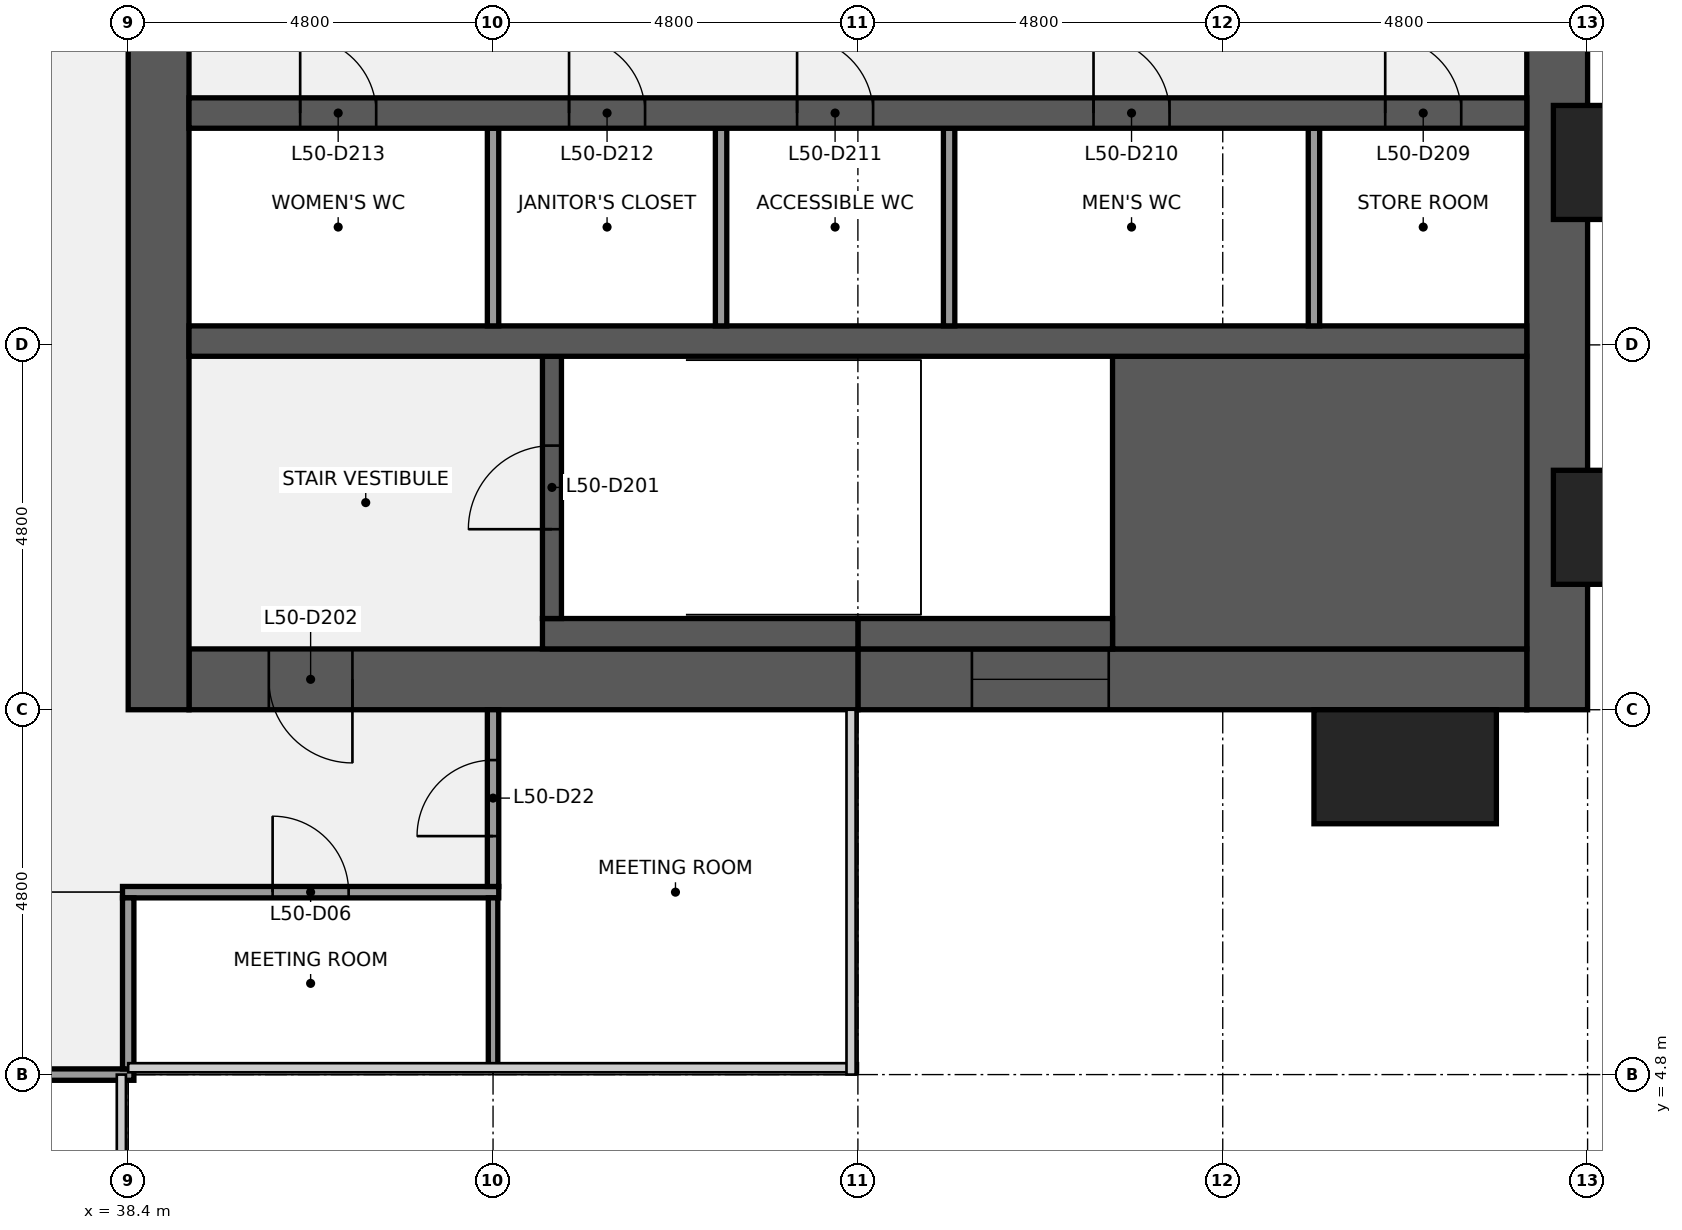
"""IFC4 building model, lengths in metres.
Left out: names, types, materials, properties, quantities, classifications, styles, units other than length and angle.
Written with IfcOpenShell. Run it as: python <this file> out.ifc"""

import sys

from ifc_helpers import new_model, si_unit, direction, frame, frame_2d, origin, origin_2d, place, context, subcontext, project, spatial, rectangle, extrude, element, fill, save


model = new_model("IFC4")
c1 = context("Model", 3, precision=1e-05, world=origin(), true_north=direction((0.0, 1.0)))
c2 = subcontext(c1, "Body", "Model", "MODEL_VIEW")
j1 = project(units=[si_unit("LENGTHUNIT", "METRE"), si_unit("PLANEANGLEUNIT", "RADIAN")], contexts=[c1])
p1 = place(None, origin())
s1 = spatial("IfcSite", under=j1, at=p1, CompositionType="ELEMENT")
p2 = place(p1, origin())
s2 = spatial("IfcBuilding", under=s1, at=p2, CompositionType="ELEMENT")
p3 = place(p2, frame((0.0, 0.0, 229.2)))
s3 = spatial("IfcBuildingStorey", under=s2, at=p3, CompositionType="ELEMENT", Elevation=229.2)
p4 = place(p3, frame((57.2, 38.4, 0.0), z_axis=(0.0, 0.0, 1.0), x_axis=(0.0, -1.0, 0.0)))
e1 = element("IfcWall", 1, at=p4, inside=s3, PredefinedType="SHEAR", context=c2, shape_type="SweptSolid", body=[
    extrude(rectangle(XDim=28.8, YDim=0.8, at=frame_2d((14.4, 0.0))), origin(), (0.0, 0.0, 1.0), 3.84),
])
p5 = place(p4, frame((18.45, 0.0, 0.9)))
e2 = element("IfcOpeningElement", 2, at=p5, cuts=e1, PredefinedType="OPENING", context=c2, shape_type="SweptSolid", body=[
    extrude(rectangle(XDim=1.5, YDim=1.5, at=frame_2d((0.75, 0.75))), frame((0.0, 0.41, 0.0), z_axis=(0.0, -1.0, 0.0), x_axis=(1.0, 0.0, 0.0)), (0.0, 0.0, 1.0), 0.82),
])
p6 = place(p4, frame((8.85, 0.0, 0.9)))
e3 = element("IfcOpeningElement", 3, at=p6, cuts=e1, PredefinedType="OPENING", context=c2, shape_type="SweptSolid", body=[
    extrude(rectangle(XDim=1.5, YDim=1.5, at=frame_2d((0.75, 0.75))), frame((0.0, 0.41, 0.0), z_axis=(0.0, -1.0, 0.0), x_axis=(1.0, 0.0, 0.0)), (0.0, 0.0, 1.0), 0.82),
])
p7 = place(p3, frame((56.8, 10.0, 0.0), z_axis=(0.0, 0.0, 1.0), x_axis=(-1.0, 0.0, 0.0)))
e4 = element("IfcWall", 4, at=p7, inside=s3, PredefinedType="SHEAR", context=c2, shape_type="SweptSolid", body=[
    extrude(rectangle(XDim=8.8, YDim=0.8, at=frame_2d((4.4, 0.0))), origin(), (0.0, 0.0, 1.0), 3.84),
])
p8 = place(p7, frame((5.5, 0.0, 0.9)))
e5 = element("IfcOpeningElement", 5, at=p8, cuts=e4, PredefinedType="OPENING", context=c2, shape_type="SweptSolid", body=[
    extrude(rectangle(XDim=1.8, YDim=1.5, at=frame_2d((0.9, 0.75))), frame((0.0, 0.41, 0.0), z_axis=(0.0, -1.0, 0.0), x_axis=(1.0, 0.0, 0.0)), (0.0, 0.0, 1.0), 0.82),
])
p9 = place(p3, frame((48.0, 10.0, 0.0), z_axis=(0.0, 0.0, 1.0), x_axis=(-1.0, 0.0, 0.0)))
e6 = element("IfcWall", 6, at=p9, inside=s3, PredefinedType="SHEAR", context=c2, shape_type="SweptSolid", body=[
    extrude(rectangle(XDim=8.8, YDim=0.8, at=frame_2d((4.4, 0.0))), origin(), (0.0, 0.0, 1.0), 3.84),
])
p10 = place(p9, frame((6.65, 0.0, 0.0)))
e7 = element("IfcOpeningElement", 7, at=p10, cuts=e6, PredefinedType="OPENING", context=c2, shape_type="SweptSolid", body=[
    extrude(rectangle(XDim=1.1, YDim=2.1, at=frame_2d((0.55, 1.05))), frame((0.0, 0.41, 0.0), z_axis=(0.0, -1.0, 0.0), x_axis=(1.0, 0.0, 0.0)), (0.0, 0.0, 1.0), 0.82),
])
p11 = place(p3, frame((38.8, 9.6, 0.0), z_axis=(0.0, 0.0, 1.0), x_axis=(0.0, 1.0, 0.0)))
e8 = element("IfcWall", 8, at=p11, inside=s3, PredefinedType="SHEAR", context=c2, shape_type="SweptSolid", body=[
    extrude(rectangle(XDim=28.8, YDim=0.8, at=frame_2d((14.4, 0.0))), origin(), (0.0, 0.0, 1.0), 3.84),
])
p12 = place(p11, frame((8.7, 0.0, 0.0)))
e9 = element("IfcOpeningElement", 9, at=p12, cuts=e8, PredefinedType="OPENING", context=c2, shape_type="SweptSolid", body=[
    extrude(rectangle(XDim=1.8, YDim=2.1, at=frame_2d((0.9, 1.05))), frame((0.0, 0.41, 0.0), z_axis=(0.0, -1.0, 0.0), x_axis=(1.0, 0.0, 0.0)), (0.0, 0.0, 1.0), 0.82),
])
p13 = place(p11, frame((18.3, 0.0, 0.0)))
e10 = element("IfcOpeningElement", 10, at=p13, cuts=e8, PredefinedType="OPENING", context=c2, shape_type="SweptSolid", body=[
    extrude(rectangle(XDim=1.8, YDim=2.1, at=frame_2d((0.9, 1.05))), frame((0.0, 0.41, 0.0), z_axis=(0.0, -1.0, 0.0), x_axis=(1.0, 0.0, 0.0)), (0.0, 0.0, 1.0), 0.82),
])
p14 = place(p3, frame((51.35, 12.325, 0.0), z_axis=(0.0, 0.0, 1.0), x_axis=(1.0, 0.0, 0.0)))
e11 = element("IfcWall", 11, at=p14, inside=s3, PredefinedType="SHEAR", context=c2, shape_type="SweptSolid", body=[
    extrude(rectangle(XDim=5.45, YDim=3.85, at=frame_2d((2.725, 0.0))), origin(), (0.0, 0.0, 1.0), 3.84),
])
p15 = place(p3, frame((48.0, 10.6, 0.0), z_axis=(0.0, 0.0, 1.0), x_axis=(1.0, 0.0, 0.0)))
e12 = element("IfcWall", 12, at=p15, inside=s3, PredefinedType="SHEAR", context=c2, shape_type="SweptSolid", body=[
    extrude(rectangle(XDim=3.35, YDim=0.4, at=frame_2d((1.675, 0.0))), origin(), (0.0, 0.0, 1.0), 3.84),
])
p16 = place(p3, frame((43.85, 10.6, 0.0), z_axis=(0.0, 0.0, 1.0), x_axis=(1.0, 0.0, 0.0)))
e13 = element("IfcWall", 13, at=p16, inside=s3, PredefinedType="SHEAR", context=c2, shape_type="SweptSolid", body=[
    extrude(rectangle(XDim=4.15, YDim=0.4, at=frame_2d((2.075, 0.0))), origin(), (0.0, 0.0, 1.0), 3.84),
])
p17 = place(p3, frame((43.975, 10.8, 0.0), z_axis=(0.0, 0.0, 1.0), x_axis=(0.0, 1.0, 0.0)))
e14 = element("IfcWall", 14, at=p17, inside=s3, PredefinedType="SHEAR", context=c2, shape_type="SweptSolid", body=[
    extrude(rectangle(XDim=3.45, YDim=0.25, at=frame_2d((1.725, 0.0))), origin(), (0.0, 0.0, 1.0), 3.84),
])
p18 = place(p17, frame((1.175, 0.0, 0.0)))
e15 = element("IfcOpeningElement", 15, at=p18, cuts=e14, PredefinedType="OPENING", context=c2, shape_type="SweptSolid", body=[
    extrude(rectangle(XDim=1.1, YDim=2.1, at=frame_2d((0.55, 1.05))), frame((0.0, 0.135, 0.0), z_axis=(0.0, -1.0, 0.0), x_axis=(1.0, 0.0, 0.0)), (0.0, 0.0, 1.0), 0.27),
])
p19 = place(p3, frame((39.2, 14.45, 0.0), z_axis=(0.0, 0.0, 1.0), x_axis=(1.0, 0.0, 0.0)))
e16 = element("IfcWall", 16, at=p19, inside=s3, PredefinedType="SHEAR", context=c2, shape_type="SweptSolid", body=[
    extrude(rectangle(XDim=17.6, YDim=0.4, at=frame_2d((8.8, 0.0))), origin(), (0.0, 0.0, 1.0), 3.84),
])
for number, where, z_axis, x_axis in (
    (17, (54.0, 14.65, 0.0), (0.0, 0.0, 1.0), (0.0, 1.0, 0.0)),
    (18, (49.2, 14.65, 0.0), (0.0, 0.0, 1.0), (0.0, 1.0, 0.0)),
    (19, (46.2, 14.65, 0.0), (0.0, 0.0, 1.0), (0.0, 1.0, 0.0)),
    (20, (43.2, 14.65, 0.0), (0.0, 0.0, 1.0), (0.0, 1.0, 0.0)),
):
    element("IfcWall", number, at=place(p3, frame(where, z_axis=z_axis, x_axis=x_axis)), inside=s3, PredefinedType="PARTITIONING", context=c2, shape_type="SweptSolid", body=[
        extrude(rectangle(XDim=2.6, YDim=0.15, at=frame_2d((1.3, 0.0))), origin(), (0.0, 0.0, 1.0), 3.84),
    ])
p20 = place(p3, frame((39.2, 17.45, 0.0), z_axis=(0.0, 0.0, 1.0), x_axis=(1.0, 0.0, 0.0)))
e21 = element("IfcWall", 21, at=p20, inside=s3, PredefinedType="SHEAR", context=c2, shape_type="SweptSolid", body=[
    extrude(rectangle(XDim=17.6, YDim=0.4, at=frame_2d((8.8, 0.0))), origin(), (0.0, 0.0, 1.0), 3.84),
])
p21 = place(p20, frame((15.738, 0.0, 0.0)))
e22 = element("IfcOpeningElement", 22, at=p21, cuts=e21, PredefinedType="OPENING", context=c2, shape_type="SweptSolid", body=[
    extrude(rectangle(XDim=1.0, YDim=2.1, at=frame_2d((0.5, 1.05))), frame((0.0, 0.21, 0.0), z_axis=(0.0, -1.0, 0.0), x_axis=(1.0, 0.0, 0.0)), (0.0, 0.0, 1.0), 0.42),
])
p22 = place(p20, frame((11.9, 0.0, 0.0)))
e23 = element("IfcOpeningElement", 23, at=p22, cuts=e21, PredefinedType="OPENING", context=c2, shape_type="SweptSolid", body=[
    extrude(rectangle(XDim=1.0, YDim=2.1, at=frame_2d((0.5, 1.05))), frame((0.0, 0.21, 0.0), z_axis=(0.0, -1.0, 0.0), x_axis=(1.0, 0.0, 0.0)), (0.0, 0.0, 1.0), 0.42),
])
p23 = place(p20, frame((8.0, 0.0, 0.0)))
e24 = element("IfcOpeningElement", 24, at=p23, cuts=e21, PredefinedType="OPENING", context=c2, shape_type="SweptSolid", body=[
    extrude(rectangle(XDim=1.0, YDim=2.1, at=frame_2d((0.5, 1.05))), frame((0.0, 0.21, 0.0), z_axis=(0.0, -1.0, 0.0), x_axis=(1.0, 0.0, 0.0)), (0.0, 0.0, 1.0), 0.42),
])
p24 = place(p20, frame((5.0, 0.0, 0.0)))
e25 = element("IfcOpeningElement", 25, at=p24, cuts=e21, PredefinedType="OPENING", context=c2, shape_type="SweptSolid", body=[
    extrude(rectangle(XDim=1.0, YDim=2.1, at=frame_2d((0.5, 1.05))), frame((0.0, 0.21, 0.0), z_axis=(0.0, -1.0, 0.0), x_axis=(1.0, 0.0, 0.0)), (0.0, 0.0, 1.0), 0.42),
])
p25 = place(p20, frame((1.462, 0.0, 0.0)))
e26 = element("IfcOpeningElement", 26, at=p25, cuts=e21, PredefinedType="OPENING", context=c2, shape_type="SweptSolid", body=[
    extrude(rectangle(XDim=1.0, YDim=2.1, at=frame_2d((0.5, 1.05))), frame((0.0, 0.21, 0.0), z_axis=(0.0, -1.0, 0.0), x_axis=(1.0, 0.0, 0.0)), (0.0, 0.0, 1.0), 0.42),
])
p26 = place(p3, frame((19.125, 4.8, 0.0), z_axis=(0.0, 0.0, 1.0), x_axis=(1.0, 0.0, 0.0)))
e27 = element("IfcWall", 27, at=p26, inside=s3, PredefinedType="PARTITIONING", context=c2, shape_type="SweptSolid", body=[
    extrude(rectangle(XDim=19.35, YDim=0.15, at=frame_2d((9.675, 0.0))), origin(), (0.0, 0.0, 1.0), 2.849),
])
p27 = place(p26, frame((0.775, 0.0, 0.0)))
e28 = element("IfcOpeningElement", 28, at=p27, cuts=e27, PredefinedType="OPENING", context=c2, shape_type="SweptSolid", body=[
    extrude(rectangle(XDim=1.0, YDim=2.1, at=frame_2d((0.5, 1.05))), frame((0.0, 0.085, 0.0), z_axis=(0.0, -1.0, 0.0), x_axis=(1.0, 0.0, 0.0)), (0.0, 0.0, 1.0), 0.17),
])
p28 = place(p26, frame((10.375, 0.0, 0.0)))
e29 = element("IfcOpeningElement", 29, at=p28, cuts=e27, PredefinedType="OPENING", context=c2, shape_type="SweptSolid", body=[
    extrude(rectangle(XDim=1.0, YDim=2.1, at=frame_2d((0.5, 1.05))), frame((0.0, 0.085, 0.0), z_axis=(0.0, -1.0, 0.0), x_axis=(1.0, 0.0, 0.0)), (0.0, 0.0, 1.0), 0.17),
])
p29 = place(p3, frame((38.325, 7.2, 0.0), z_axis=(0.0, 0.0, 1.0), x_axis=(1.0, 0.0, 0.0)))
e30 = element("IfcWall", 30, at=p29, inside=s3, PredefinedType="PARTITIONING", context=c2, shape_type="SweptSolid", body=[
    extrude(rectangle(XDim=4.95, YDim=0.15, at=frame_2d((2.475, 0.0))), origin(), (0.0, 0.0, 1.0), 2.849),
])
p30 = place(p29, frame((1.975, 0.0, 0.0)))
e31 = element("IfcOpeningElement", 31, at=p30, cuts=e30, PredefinedType="OPENING", context=c2, shape_type="SweptSolid", body=[
    extrude(rectangle(XDim=1.0, YDim=2.1, at=frame_2d((0.5, 1.05))), frame((0.0, 0.085, 0.0), z_axis=(0.0, -1.0, 0.0), x_axis=(1.0, 0.0, 0.0)), (0.0, 0.0, 1.0), 0.17),
])
p31 = place(p3, frame((38.4, 4.875, 0.0), z_axis=(0.0, 0.0, 1.0), x_axis=(0.0, 1.0, 0.0)))
e32 = element("IfcWall", 32, at=p31, inside=s3, PredefinedType="PARTITIONING", context=c2, shape_type="SweptSolid", body=[
    extrude(rectangle(XDim=2.25, YDim=0.15, at=frame_2d((1.125, 0.0))), origin(), (0.0, 0.0, 1.0), 2.849),
])
p32 = place(p3, frame((43.2, 4.9, 0.0), z_axis=(0.0, 0.0, 1.0), x_axis=(0.0, 1.0, 0.0)))
e33 = element("IfcWall", 33, at=p32, inside=s3, PredefinedType="PARTITIONING", context=c2, shape_type="SweptSolid", body=[
    extrude(rectangle(XDim=2.225, YDim=0.125, at=frame_2d((1.113, 0.0))), origin(), (0.0, 0.0, 1.0), 2.849),
])
p33 = place(p3, frame((43.2, 7.275, 0.0), z_axis=(0.0, 0.0, 1.0), x_axis=(0.0, 1.0, 0.0)))
e34 = element("IfcWall", 34, at=p33, inside=s3, PredefinedType="PARTITIONING", context=c2, shape_type="SweptSolid", body=[
    extrude(rectangle(XDim=2.325, YDim=0.15, at=frame_2d((1.163, 0.0))), origin(), (0.0, 0.0, 1.0), 2.849),
])
p34 = place(p33, frame((0.663, 0.0, 0.0)))
e35 = element("IfcOpeningElement", 35, at=p34, cuts=e34, PredefinedType="OPENING", context=c2, shape_type="SweptSolid", body=[
    extrude(rectangle(XDim=1.0, YDim=2.1, at=frame_2d((0.5, 1.05))), frame((0.0, 0.085, 0.0), z_axis=(0.0, -1.0, 0.0), x_axis=(1.0, 0.0, 0.0)), (0.0, 0.0, 1.0), 0.17),
])
for number, where, z_axis, x_axis in (
    (36, (55.2, 8.85, 0.0), (0.0, 0.0, 1.0), (1.0, 0.0, 0.0)),
    (37, (58.35, 12.0, 0.0), (0.0, 0.0, 1.0), (0.0, 1.0, 0.0)),
    (38, (58.35, 16.8, 0.0), (0.0, 0.0, 1.0), (0.0, 1.0, 0.0)),
):
    element("IfcColumn", number, at=place(p3, frame(where, z_axis=z_axis, x_axis=x_axis)), inside=s3, PredefinedType="PILASTER", context=c2, shape_type="SweptSolid", body=[
        extrude(rectangle(XDim=2.4, YDim=1.5, at=origin_2d()), origin(), (0.0, 0.0, 1.0), 4.0),
    ])
p35 = place(p18, origin())
e39 = element("IfcDoor", 39, at=p35, inside=s3, OperationType="SINGLE_SWING_LEFT", PredefinedType="DOOR", context=c2, shape_type="SweptSolid", body=[
    extrude(rectangle(XDim=1.1, YDim=2.1, at=frame_2d((0.55, 1.05))), frame((0.0, 0.025, 0.0), z_axis=(0.0, -1.0, 0.0), x_axis=(1.0, 0.0, 0.0)), (0.0, 0.0, 1.0), 0.05),
])
fill(e15, e39)
p36 = place(p10, origin())
e40 = element("IfcDoor", 40, at=p36, inside=s3, OperationType="SINGLE_SWING_LEFT", PredefinedType="DOOR", context=c2, shape_type="SweptSolid", body=[
    extrude(rectangle(XDim=1.1, YDim=2.1, at=frame_2d((0.55, 1.05))), frame((0.0, 0.025, 0.0), z_axis=(0.0, -1.0, 0.0), x_axis=(1.0, 0.0, 0.0)), (0.0, 0.0, 1.0), 0.05),
])
fill(e7, e40)
p37 = place(p21, origin())
e41 = element("IfcDoor", 41, at=p37, inside=s3, OperationType="SINGLE_SWING_LEFT", PredefinedType="DOOR", context=c2, shape_type="SweptSolid", body=[
    extrude(rectangle(XDim=1.0, YDim=2.1, at=frame_2d((0.5, 1.05))), frame((0.0, 0.025, 0.0), z_axis=(0.0, -1.0, 0.0), x_axis=(1.0, 0.0, 0.0)), (0.0, 0.0, 1.0), 0.05),
])
fill(e22, e41)
p38 = place(p22, origin())
e42 = element("IfcDoor", 42, at=p38, inside=s3, OperationType="SINGLE_SWING_LEFT", PredefinedType="DOOR", context=c2, shape_type="SweptSolid", body=[
    extrude(rectangle(XDim=1.0, YDim=2.1, at=frame_2d((0.5, 1.05))), frame((0.0, 0.025, 0.0), z_axis=(0.0, -1.0, 0.0), x_axis=(1.0, 0.0, 0.0)), (0.0, 0.0, 1.0), 0.05),
])
fill(e23, e42)
p39 = place(p23, origin())
e43 = element("IfcDoor", 43, at=p39, inside=s3, OperationType="SINGLE_SWING_LEFT", PredefinedType="DOOR", context=c2, shape_type="SweptSolid", body=[
    extrude(rectangle(XDim=1.0, YDim=2.1, at=frame_2d((0.5, 1.05))), frame((0.0, 0.025, 0.0), z_axis=(0.0, -1.0, 0.0), x_axis=(1.0, 0.0, 0.0)), (0.0, 0.0, 1.0), 0.05),
])
fill(e24, e43)
p40 = place(p24, origin())
e44 = element("IfcDoor", 44, at=p40, inside=s3, OperationType="SINGLE_SWING_LEFT", PredefinedType="DOOR", context=c2, shape_type="SweptSolid", body=[
    extrude(rectangle(XDim=1.0, YDim=2.1, at=frame_2d((0.5, 1.05))), frame((0.0, 0.025, 0.0), z_axis=(0.0, -1.0, 0.0), x_axis=(1.0, 0.0, 0.0)), (0.0, 0.0, 1.0), 0.05),
])
fill(e25, e44)
p41 = place(p25, origin())
e45 = element("IfcDoor", 45, at=p41, inside=s3, OperationType="SINGLE_SWING_LEFT", PredefinedType="DOOR", context=c2, shape_type="SweptSolid", body=[
    extrude(rectangle(XDim=1.0, YDim=2.1, at=frame_2d((0.5, 1.05))), frame((0.0, 0.025, 0.0), z_axis=(0.0, -1.0, 0.0), x_axis=(1.0, 0.0, 0.0)), (0.0, 0.0, 1.0), 0.05),
])
fill(e26, e45)
p42 = place(p8, origin())
e46 = element("IfcWindow", 46, at=p42, inside=s3, PartitioningType="SINGLE_PANEL", PredefinedType="WINDOW", context=c2, shape_type="SweptSolid", body=[
    extrude(rectangle(XDim=1.8, YDim=1.5, at=frame_2d((0.9, 0.75))), frame((0.0, 0.03, 0.0), z_axis=(0.0, -1.0, 0.0), x_axis=(1.0, 0.0, 0.0)), (0.0, 0.0, 1.0), 0.06),
])
fill(e5, e46)
p43 = place(p30, origin())
e47 = element("IfcDoor", 47, at=p43, inside=s3, OperationType="SINGLE_SWING_LEFT", PredefinedType="DOOR", context=c2, shape_type="SweptSolid", body=[
    extrude(rectangle(XDim=1.0, YDim=2.1, at=frame_2d((0.5, 1.05))), frame((0.0, 0.025, 0.0), z_axis=(0.0, -1.0, 0.0), x_axis=(1.0, 0.0, 0.0)), (0.0, 0.0, 1.0), 0.05),
])
fill(e31, e47)
p44 = place(p34, origin())
e48 = element("IfcDoor", 48, at=p44, inside=s3, OperationType="SINGLE_SWING_LEFT", PredefinedType="DOOR", context=c2, shape_type="SweptSolid", body=[
    extrude(rectangle(XDim=1.0, YDim=2.1, at=frame_2d((0.5, 1.05))), frame((0.0, 0.025, 0.0), z_axis=(0.0, -1.0, 0.0), x_axis=(1.0, 0.0, 0.0)), (0.0, 0.0, 1.0), 0.05),
])
fill(e35, e48)
save(model, sys.argv[1])
